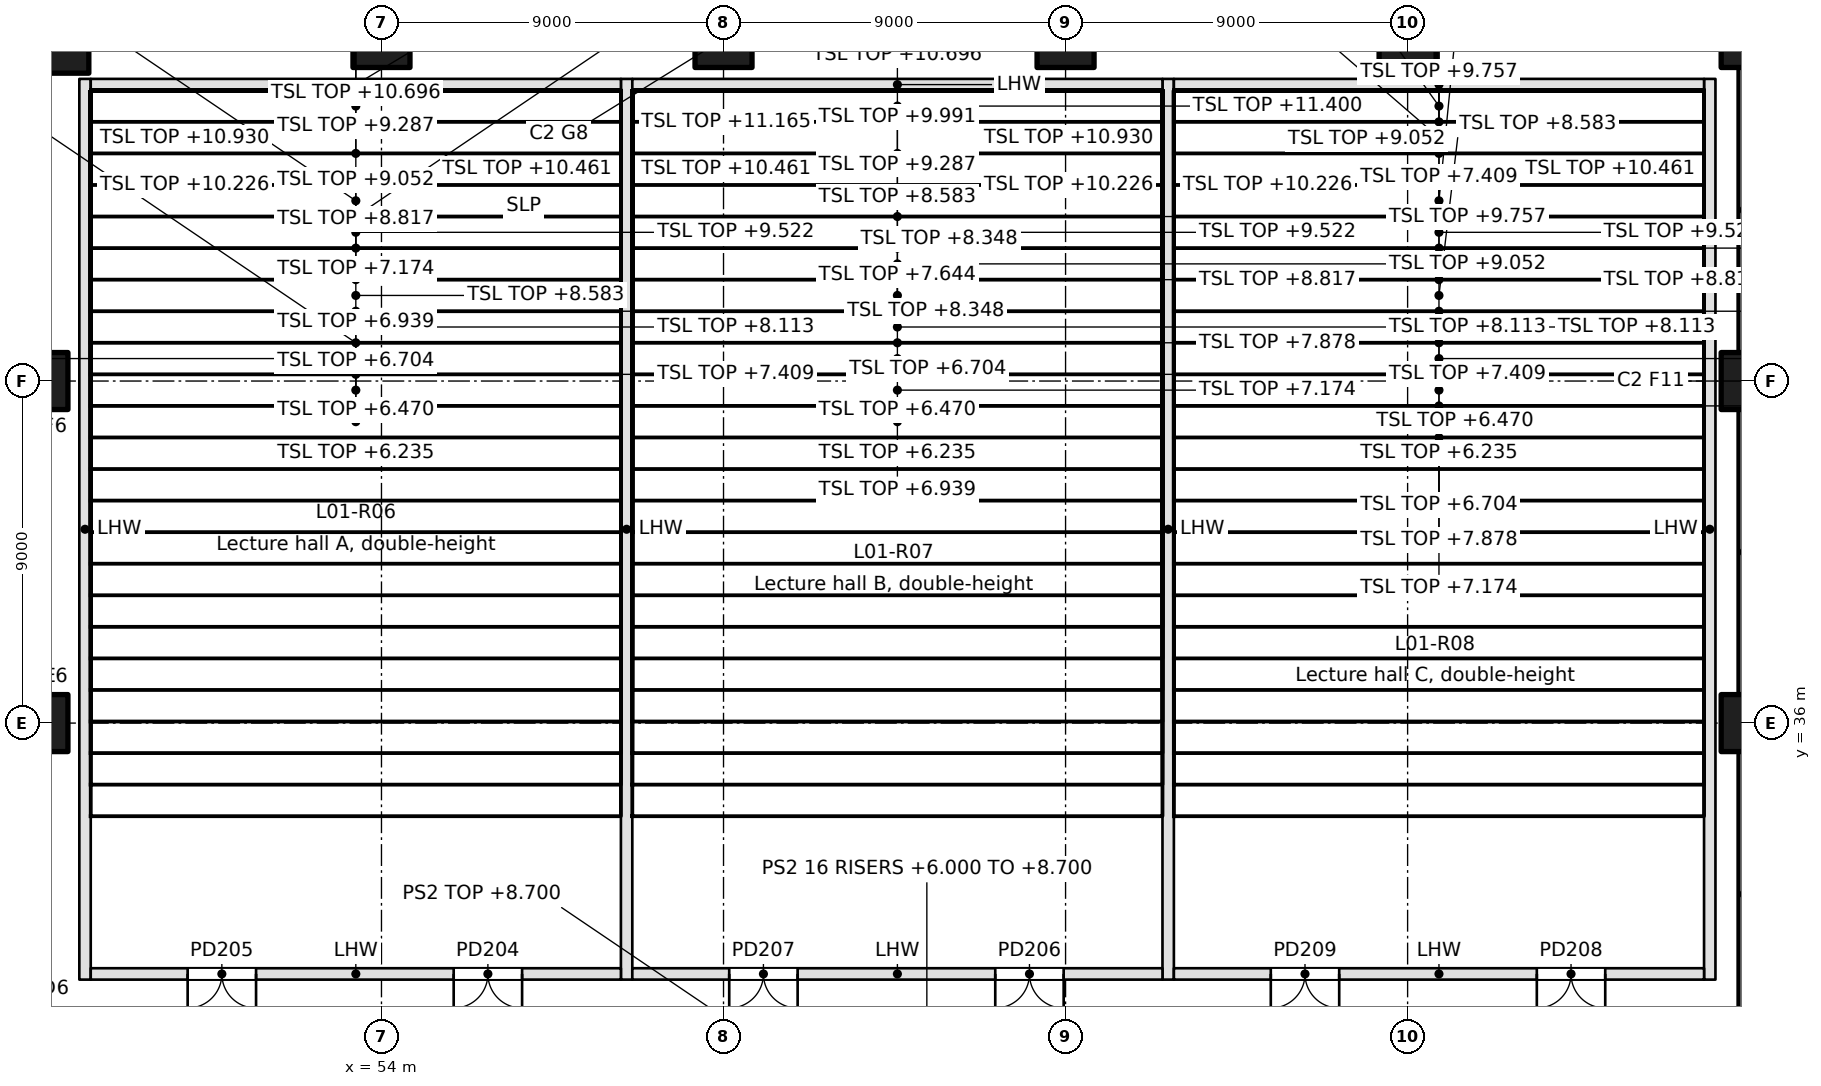
"""IFC4 building model, lengths in metres.
Left out: names, types, materials, properties, quantities, classifications, styles, units other than length and angle.
Written with IfcOpenShell. Run it as: python <this file> out.ifc"""

import sys

from ifc_helpers import new_model, si_unit, direction, frame, frame_2d, origin, origin_2d, place, context, subcontext, project, spatial, rectangle, extrude, element, fill, save


model = new_model("IFC4")
c1 = context("Model", 3, precision=1e-05, world=origin(), true_north=direction((0.0, 1.0)))
c2 = subcontext(c1, "Body", "Model", "MODEL_VIEW")
j1 = project(units=[si_unit("LENGTHUNIT", "METRE"), si_unit("PLANEANGLEUNIT", "RADIAN")], contexts=[c1])
p1 = place(None, origin())
s1 = spatial("IfcSite", under=j1, at=p1, CompositionType="ELEMENT")
p2 = place(p1, origin())
s2 = spatial("IfcBuilding", under=s1, at=p2, CompositionType="ELEMENT")
p3 = place(p2, frame((0.0, 0.0, 6.0)))
s3 = spatial("IfcBuildingStorey", under=s2, at=p3, CompositionType="ELEMENT", Elevation=6.0)
for number, where, z_axis, x_axis in (
    (1, (45.0, 36.0, 0.0), (0.0, 0.0, 1.0), (1.0, 0.0, 0.0)),
    (2, (45.0, 45.0, 0.0), (0.0, 0.0, 1.0), (1.0, 0.0, 0.0)),
):
    element("IfcColumn", number, at=place(p3, frame(where, z_axis=z_axis, x_axis=x_axis)), inside=s3, PredefinedType="COLUMN", context=c2, shape_type="SweptSolid", body=[
        extrude(rectangle(XDim=1.5, YDim=1.5, at=origin_2d()), origin(), (0.0, 0.0, 1.0), 5.4),
    ])
p4 = place(p3, frame((45.0, 54.0, 0.0), z_axis=(0.0, 0.0, 1.0), x_axis=(1.0, 0.0, 0.0)))
e3 = element("IfcColumn", 3, at=p4, inside=s3, PredefinedType="COLUMN", context=c2, shape_type="SweptSolid", body=[
    extrude(rectangle(XDim=2.6, YDim=1.8, at=origin_2d()), origin(), (0.0, 0.0, 1.0), 5.4),
])
for number, where, z_axis, x_axis in (
    (4, (54.0, 54.0, 0.0), (0.0, 0.0, 1.0), (1.0, 0.0, 0.0)),
    (5, (63.0, 54.0, 0.0), (0.0, 0.0, 1.0), (1.0, 0.0, 0.0)),
    (6, (72.0, 54.0, 0.0), (0.0, 0.0, 1.0), (1.0, 0.0, 0.0)),
    (7, (81.0, 54.0, 0.0), (0.0, 0.0, 1.0), (1.0, 0.0, 0.0)),
    (8, (90.0, 54.0, 0.0), (0.0, 0.0, 1.0), (1.0, 0.0, 0.0)),
    (9, (90.0, 36.0, 0.0), (0.0, 0.0, 1.0), (1.0, 0.0, 0.0)),
    (10, (90.0, 45.0, 0.0), (0.0, 0.0, 1.0), (1.0, 0.0, 0.0)),
):
    element("IfcColumn", number, at=place(p3, frame(where, z_axis=z_axis, x_axis=x_axis)), inside=s3, PredefinedType="COLUMN", context=c2, shape_type="SweptSolid", body=[
        extrude(rectangle(XDim=1.5, YDim=1.5, at=origin_2d()), origin(), (0.0, 0.0, 1.0), 5.4),
    ])
for number, where, z_axis, x_axis in (
    (11, (46.2, 29.25, 0.0), (0.0, 0.0, 1.0), (0.0, 1.0, 0.0)),
    (12, (60.45, 29.25, 0.0), (0.0, 0.0, 1.0), (0.0, 1.0, 0.0)),
    (13, (74.7, 29.25, 0.0), (0.0, 0.0, 1.0), (0.0, 1.0, 0.0)),
    (14, (88.95, 29.25, 0.0), (0.0, 0.0, 1.0), (0.0, 1.0, 0.0)),
):
    element("IfcWall", number, at=place(p3, frame(where, z_axis=z_axis, x_axis=x_axis)), inside=s3, PredefinedType="SOLIDWALL", context=c2, shape_type="SweptSolid", body=[
        extrude(rectangle(XDim=23.7, YDim=0.3, at=frame_2d((11.85, 0.0))), origin(), (0.0, 0.0, 1.0), 5.4),
    ])
p5 = place(p3, frame((60.3, 29.4, 0.0), z_axis=(0.0, 0.0, 1.0), x_axis=(-1.0, 0.0, 0.0)))
e15 = element("IfcWall", 15, at=p5, inside=s3, PredefinedType="SOLIDWALL", context=c2, shape_type="SweptSolid", body=[
    extrude(rectangle(XDim=13.95, YDim=0.3, at=frame_2d((6.975, 0.0))), origin(), (0.0, 0.0, 1.0), 5.4),
])
p6 = place(p5, frame((2.6, 0.0, 0.0)))
e16 = element("IfcOpeningElement", 16, at=p6, cuts=e15, PredefinedType="OPENING", context=c2, shape_type="SweptSolid", body=[
    extrude(rectangle(XDim=1.8, YDim=2.4, at=frame_2d((0.9, 1.2))), frame((0.0, 0.15, 0.0), z_axis=(0.0, -1.0, 0.0), x_axis=(1.0, 0.0, 0.0)), (0.0, 0.0, 1.0), 0.3),
])
p7 = place(p5, frame((9.6, 0.0, 0.0)))
e17 = element("IfcOpeningElement", 17, at=p7, cuts=e15, PredefinedType="OPENING", context=c2, shape_type="SweptSolid", body=[
    extrude(rectangle(XDim=1.8, YDim=2.4, at=frame_2d((0.9, 1.2))), frame((0.0, 0.15, 0.0), z_axis=(0.0, -1.0, 0.0), x_axis=(1.0, 0.0, 0.0)), (0.0, 0.0, 1.0), 0.3),
])
p8 = place(p3, frame((46.35, 52.8, 0.0), z_axis=(0.0, 0.0, 1.0), x_axis=(1.0, 0.0, 0.0)))
e18 = element("IfcWall", 18, at=p8, inside=s3, PredefinedType="SOLIDWALL", context=c2, shape_type="SweptSolid", body=[
    extrude(rectangle(XDim=13.95, YDim=0.3, at=frame_2d((6.975, 0.0))), origin(), (0.0, 0.0, 1.0), 5.4),
])
p9 = place(p3, frame((74.55, 29.4, 0.0), z_axis=(0.0, 0.0, 1.0), x_axis=(-1.0, 0.0, 0.0)))
e19 = element("IfcWall", 19, at=p9, inside=s3, PredefinedType="SOLIDWALL", context=c2, shape_type="SweptSolid", body=[
    extrude(rectangle(XDim=13.95, YDim=0.3, at=frame_2d((6.975, 0.0))), origin(), (0.0, 0.0, 1.0), 5.4),
])
p10 = place(p9, frame((2.6, 0.0, 0.0)))
e20 = element("IfcOpeningElement", 20, at=p10, cuts=e19, PredefinedType="OPENING", context=c2, shape_type="SweptSolid", body=[
    extrude(rectangle(XDim=1.8, YDim=2.4, at=frame_2d((0.9, 1.2))), frame((0.0, 0.15, 0.0), z_axis=(0.0, -1.0, 0.0), x_axis=(1.0, 0.0, 0.0)), (0.0, 0.0, 1.0), 0.3),
])
p11 = place(p9, frame((9.6, 0.0, 0.0)))
e21 = element("IfcOpeningElement", 21, at=p11, cuts=e19, PredefinedType="OPENING", context=c2, shape_type="SweptSolid", body=[
    extrude(rectangle(XDim=1.8, YDim=2.4, at=frame_2d((0.9, 1.2))), frame((0.0, 0.15, 0.0), z_axis=(0.0, -1.0, 0.0), x_axis=(1.0, 0.0, 0.0)), (0.0, 0.0, 1.0), 0.3),
])
p12 = place(p3, frame((60.6, 52.8, 0.0), z_axis=(0.0, 0.0, 1.0), x_axis=(1.0, 0.0, 0.0)))
e22 = element("IfcWall", 22, at=p12, inside=s3, PredefinedType="SOLIDWALL", context=c2, shape_type="SweptSolid", body=[
    extrude(rectangle(XDim=13.95, YDim=0.3, at=frame_2d((6.975, 0.0))), origin(), (0.0, 0.0, 1.0), 5.4),
])
p13 = place(p3, frame((88.8, 29.4, 0.0), z_axis=(0.0, 0.0, 1.0), x_axis=(-1.0, 0.0, 0.0)))
e23 = element("IfcWall", 23, at=p13, inside=s3, PredefinedType="SOLIDWALL", context=c2, shape_type="SweptSolid", body=[
    extrude(rectangle(XDim=13.95, YDim=0.3, at=frame_2d((6.975, 0.0))), origin(), (0.0, 0.0, 1.0), 5.4),
])
p14 = place(p13, frame((2.6, 0.0, 0.0)))
e24 = element("IfcOpeningElement", 24, at=p14, cuts=e23, PredefinedType="OPENING", context=c2, shape_type="SweptSolid", body=[
    extrude(rectangle(XDim=1.8, YDim=2.4, at=frame_2d((0.9, 1.2))), frame((0.0, 0.15, 0.0), z_axis=(0.0, -1.0, 0.0), x_axis=(1.0, 0.0, 0.0)), (0.0, 0.0, 1.0), 0.3),
])
p15 = place(p13, frame((9.6, 0.0, 0.0)))
e25 = element("IfcOpeningElement", 25, at=p15, cuts=e23, PredefinedType="OPENING", context=c2, shape_type="SweptSolid", body=[
    extrude(rectangle(XDim=1.8, YDim=2.4, at=frame_2d((0.9, 1.2))), frame((0.0, 0.15, 0.0), z_axis=(0.0, -1.0, 0.0), x_axis=(1.0, 0.0, 0.0)), (0.0, 0.0, 1.0), 0.3),
])
p16 = place(p3, frame((74.85, 52.8, 0.0), z_axis=(0.0, 0.0, 1.0), x_axis=(1.0, 0.0, 0.0)))
e26 = element("IfcWall", 26, at=p16, inside=s3, PredefinedType="SOLIDWALL", context=c2, shape_type="SweptSolid", body=[
    extrude(rectangle(XDim=13.95, YDim=0.3, at=frame_2d((6.975, 0.0))), origin(), (0.0, 0.0, 1.0), 5.4),
])
for number, where, z_axis, x_axis in (
    (27, (89.85, 27.75, 0.0), (0.0, 0.0, 1.0), (0.0, 1.0, 0.0)),
    (28, (89.85, 36.75, 0.0), (0.0, 0.0, 1.0), (0.0, 1.0, 0.0)),
    (29, (89.85, 45.75, 0.0), (0.0, 0.0, 1.0), (0.0, 1.0, 0.0)),
):
    element("IfcWall", number, at=place(p3, frame(where, z_axis=z_axis, x_axis=x_axis)), inside=s3, PredefinedType="SOLIDWALL", context=c2, shape_type="SweptSolid", body=[
        extrude(rectangle(XDim=7.5, YDim=0.3, at=frame_2d((3.75, 0.0))), origin(), (0.0, 0.0, 1.0), 5.05),
    ])
p17 = place(p6, origin())
e30 = element("IfcDoor", 30, at=p17, inside=s3, OperationType="DOUBLE_DOOR_SINGLE_SWING", PredefinedType="DOOR", context=c2, shape_type="SweptSolid", body=[
    extrude(rectangle(XDim=1.8, YDim=2.4, at=frame_2d((0.9, 1.2))), frame((0.0, 0.025, 0.0), z_axis=(0.0, -1.0, 0.0), x_axis=(1.0, 0.0, 0.0)), (0.0, 0.0, 1.0), 0.05),
])
fill(e16, e30)
p18 = place(p7, origin())
e31 = element("IfcDoor", 31, at=p18, inside=s3, OperationType="DOUBLE_DOOR_SINGLE_SWING", PredefinedType="DOOR", context=c2, shape_type="SweptSolid", body=[
    extrude(rectangle(XDim=1.8, YDim=2.4, at=frame_2d((0.9, 1.2))), frame((0.0, 0.025, 0.0), z_axis=(0.0, -1.0, 0.0), x_axis=(1.0, 0.0, 0.0)), (0.0, 0.0, 1.0), 0.05),
])
fill(e17, e31)
p19 = place(p10, origin())
e32 = element("IfcDoor", 32, at=p19, inside=s3, OperationType="DOUBLE_DOOR_SINGLE_SWING", PredefinedType="DOOR", context=c2, shape_type="SweptSolid", body=[
    extrude(rectangle(XDim=1.8, YDim=2.4, at=frame_2d((0.9, 1.2))), frame((0.0, 0.025, 0.0), z_axis=(0.0, -1.0, 0.0), x_axis=(1.0, 0.0, 0.0)), (0.0, 0.0, 1.0), 0.05),
])
fill(e20, e32)
p20 = place(p11, origin())
e33 = element("IfcDoor", 33, at=p20, inside=s3, OperationType="DOUBLE_DOOR_SINGLE_SWING", PredefinedType="DOOR", context=c2, shape_type="SweptSolid", body=[
    extrude(rectangle(XDim=1.8, YDim=2.4, at=frame_2d((0.9, 1.2))), frame((0.0, 0.025, 0.0), z_axis=(0.0, -1.0, 0.0), x_axis=(1.0, 0.0, 0.0)), (0.0, 0.0, 1.0), 0.05),
])
fill(e21, e33)
p21 = place(p14, origin())
e34 = element("IfcDoor", 34, at=p21, inside=s3, OperationType="DOUBLE_DOOR_SINGLE_SWING", PredefinedType="DOOR", context=c2, shape_type="SweptSolid", body=[
    extrude(rectangle(XDim=1.8, YDim=2.4, at=frame_2d((0.9, 1.2))), frame((0.0, 0.025, 0.0), z_axis=(0.0, -1.0, 0.0), x_axis=(1.0, 0.0, 0.0)), (0.0, 0.0, 1.0), 0.05),
])
fill(e24, e34)
p22 = place(p15, origin())
e35 = element("IfcDoor", 35, at=p22, inside=s3, OperationType="DOUBLE_DOOR_SINGLE_SWING", PredefinedType="DOOR", context=c2, shape_type="SweptSolid", body=[
    extrude(rectangle(XDim=1.8, YDim=2.4, at=frame_2d((0.9, 1.2))), frame((0.0, 0.025, 0.0), z_axis=(0.0, -1.0, 0.0), x_axis=(1.0, 0.0, 0.0)), (0.0, 0.0, 1.0), 0.05),
])
fill(e25, e35)
save(model, sys.argv[1])
